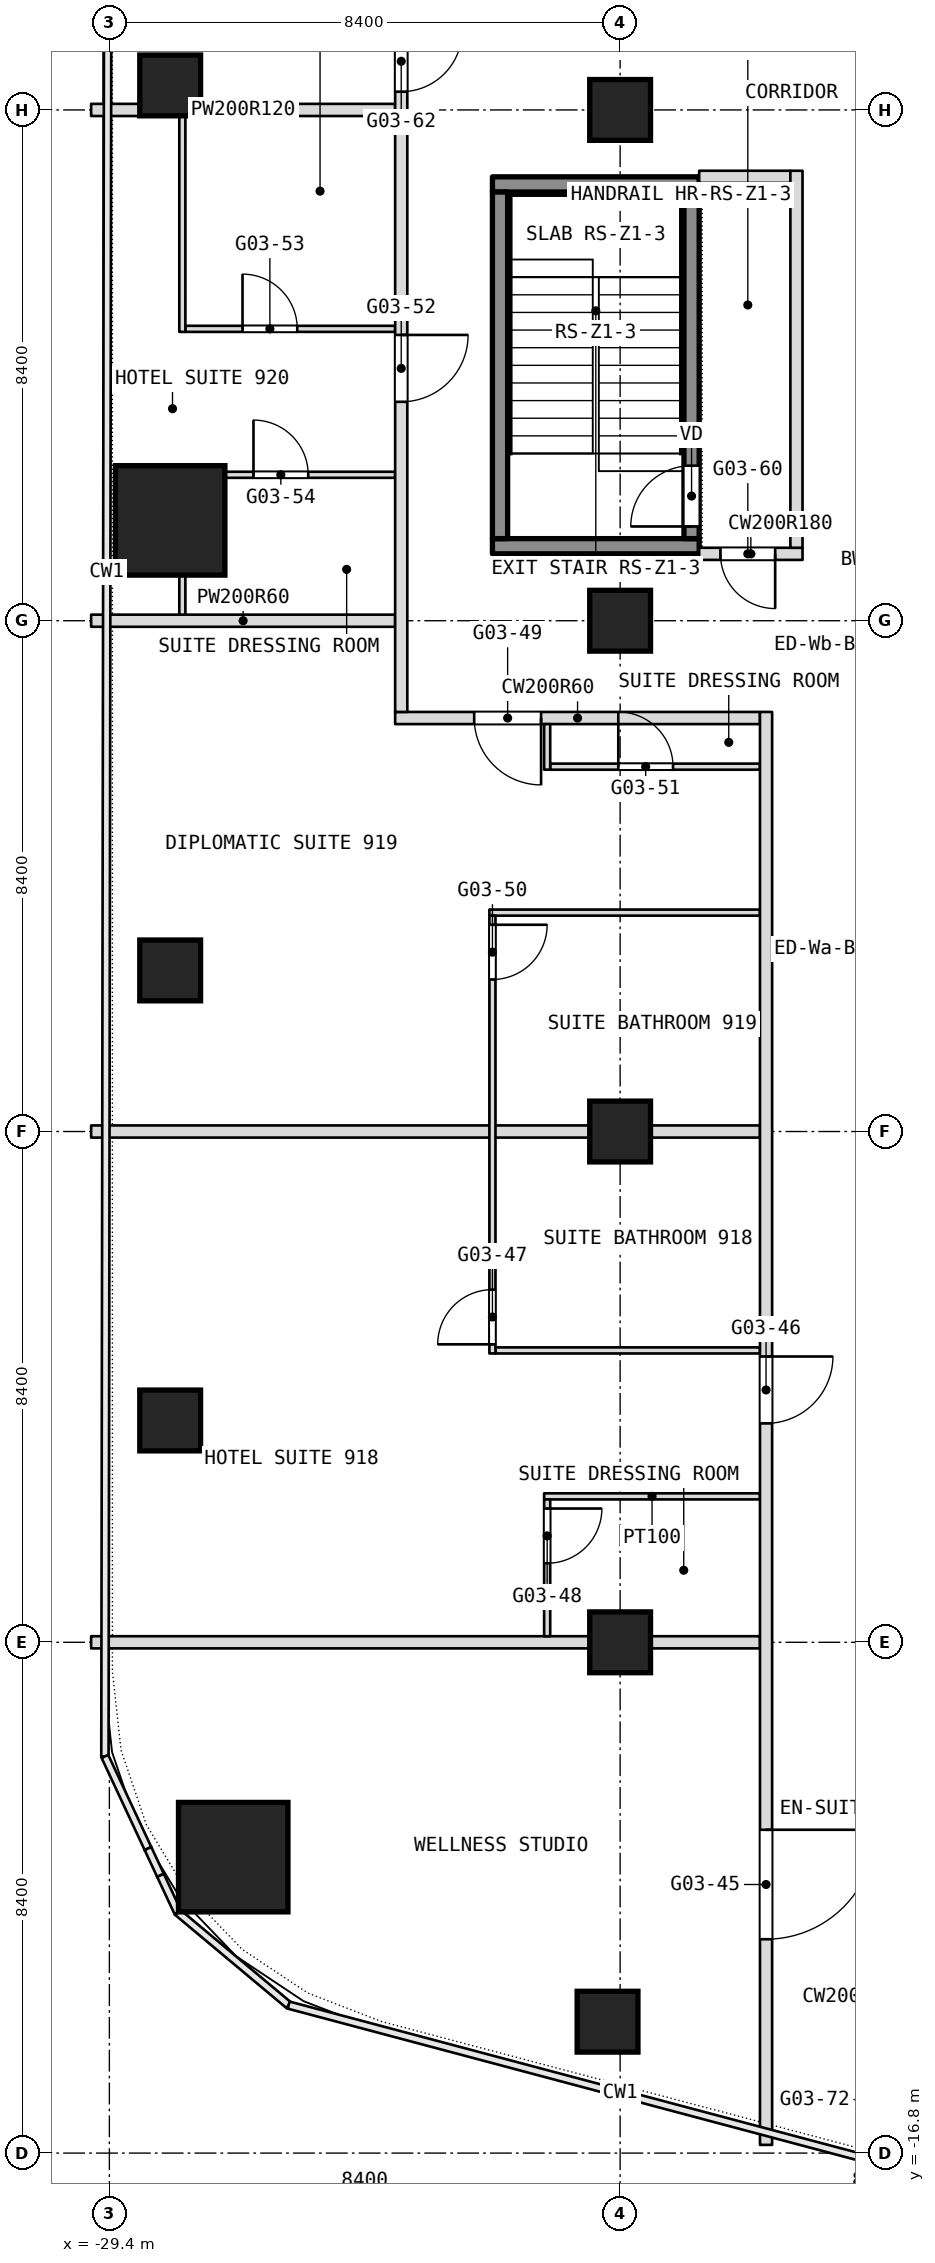
"""IFC4 building model, lengths in metres.
Left out: names, types, materials, properties, quantities, classifications, styles, units other than length and angle.
Written with IfcOpenShell. Run it as: python <this file> out.ifc"""

import sys

from ifc_helpers import new_model, si_unit, direction, frame, frame_2d, origin, origin_2d, place, context, subcontext, project, spatial, rectangle, extrude, element, fill, save


model = new_model("IFC4")
c1 = context("Model", 3, precision=1e-05, world=origin(), true_north=direction((0.0, 1.0)))
c2 = subcontext(c1, "Body", "Model", "MODEL_VIEW")
j1 = project(units=[si_unit("LENGTHUNIT", "METRE"), si_unit("PLANEANGLEUNIT", "RADIAN")], contexts=[c1])
p1 = place(None, origin())
s1 = spatial("IfcSite", under=j1, at=p1, CompositionType="ELEMENT")
p2 = place(p1, origin())
s2 = spatial("IfcBuilding", under=s1, at=p2, CompositionType="ELEMENT")
p3 = place(p2, frame((0.0, 0.0, 47.3)))
s3 = spatial("IfcBuildingStorey", under=s2, at=p3, CompositionType="ELEMENT", Elevation=47.3)
for number, where, z_axis, x_axis in (
    (1, (-27.363, -11.933, 0.0), (0.0, 0.0, 1.0), (1.0, 0.0, 0.0)),
    (2, (-28.4, 10.05, 0.0), (0.0, 0.0, 1.0), (1.0, 0.0, 0.0)),
):
    element("IfcColumn", number, at=place(p3, frame(where, z_axis=z_axis, x_axis=x_axis)), inside=s3, PredefinedType="COLUMN", context=c2, shape_type="SweptSolid", body=[
        extrude(rectangle(XDim=1.8, YDim=1.8, at=origin_2d()), origin(), (0.0, 0.0, 1.0), 3.6),
    ])
for number, where, z_axis, x_axis in (
    (3, (-21.0, -8.4, 0.0), (0.0, 0.0, 1.0), (1.0, 0.0, 0.0)),
    (4, (-21.0, 0.0, 0.0), (0.0, 0.0, 1.0), (1.0, 0.0, 0.0)),
    (5, (-21.0, 8.4, 0.0), (0.0, 0.0, 1.0), (1.0, 0.0, 0.0)),
    (6, (-21.0, 16.8, 0.0), (0.0, 0.0, 1.0), (1.0, 0.0, 0.0)),
    (7, (-28.4, -4.752, 0.0), (0.0, 0.0, 1.0), (1.0, 0.0, 0.0)),
    (8, (-28.4, 2.649, 0.0), (0.0, 0.0, 1.0), (1.0, 0.0, 0.0)),
    (9, (-28.4, 17.203, 0.0), (0.0, 0.0, 1.0), (1.0, 0.0, 0.0)),
    (10, (-21.207, -14.639, 0.0), (0.0, 0.0, 1.0), (1.0, 0.0, 0.0)),
):
    element("IfcColumn", number, at=place(p3, frame(where, z_axis=z_axis, x_axis=x_axis)), inside=s3, PredefinedType="COLUMN", context=c2, shape_type="SweptSolid", body=[
        extrude(rectangle(XDim=1.0, YDim=1.0, at=origin_2d()), origin(), (0.0, 0.0, 1.0), 3.6),
    ])
p4 = place(p3, frame((-29.7, -8.4, 0.0), z_axis=(0.0, 0.0, 1.0), x_axis=(1.0, 0.0, 0.0)))
e11 = element("IfcWall", 11, at=p4, inside=s3, PredefinedType="PARTITIONING", context=c2, shape_type="SweptSolid", body=[
    extrude(rectangle(XDim=11.0, YDim=0.2, at=frame_2d((5.5, 0.0))), origin(), (0.0, 0.0, 1.0), 2.84),
])
p5 = place(p3, frame((-22.25, -6.0, 0.0), z_axis=(0.0, 0.0, 1.0), x_axis=(1.0, 0.0, 0.0)))
e12 = element("IfcWall", 12, at=p5, inside=s3, PredefinedType="PARTITIONING", context=c2, shape_type="SweptSolid", body=[
    extrude(rectangle(XDim=3.55, YDim=0.1, at=frame_2d((1.775, 0.0))), origin(), (0.0, 0.0, 1.0), 3.34),
])
p6 = place(p3, frame((-23.05, -3.6, 0.0), z_axis=(0.0, 0.0, 1.0), x_axis=(1.0, 0.0, 0.0)))
e13 = element("IfcWall", 13, at=p6, inside=s3, PredefinedType="PARTITIONING", context=c2, shape_type="SweptSolid", body=[
    extrude(rectangle(XDim=4.35, YDim=0.1, at=frame_2d((2.175, 0.0))), origin(), (0.0, 0.0, 1.0), 3.34),
])
p7 = place(p3, frame((-29.7, 0.0, 0.0), z_axis=(0.0, 0.0, 1.0), x_axis=(1.0, 0.0, 0.0)))
e14 = element("IfcWall", 14, at=p7, inside=s3, PredefinedType="PARTITIONING", context=c2, shape_type="SweptSolid", body=[
    extrude(rectangle(XDim=11.0, YDim=0.2, at=frame_2d((5.5, 0.0))), origin(), (0.0, 0.0, 1.0), 2.84),
])
p8 = place(p3, frame((-23.15, 3.6, 0.0), z_axis=(0.0, 0.0, 1.0), x_axis=(1.0, 0.0, 0.0)))
e15 = element("IfcWall", 15, at=p8, inside=s3, PredefinedType="PARTITIONING", context=c2, shape_type="SweptSolid", body=[
    extrude(rectangle(XDim=4.45, YDim=0.1, at=frame_2d((2.225, 0.0))), origin(), (0.0, 0.0, 1.0), 3.34),
])
p9 = place(p3, frame((-22.15, 6.0, 0.0), z_axis=(0.0, 0.0, 1.0), x_axis=(1.0, 0.0, 0.0)))
e16 = element("IfcWall", 16, at=p9, inside=s3, PredefinedType="PARTITIONING", context=c2, shape_type="SweptSolid", body=[
    extrude(rectangle(XDim=3.45, YDim=0.1, at=frame_2d((1.725, 0.0))), origin(), (0.0, 0.0, 1.0), 3.34),
])
p10 = place(p9, frame((1.12, 0.0, 0.0)))
e17 = element("IfcOpeningElement", 17, at=p10, cuts=e16, PredefinedType="OPENING", context=c2, shape_type="SweptSolid", body=[
    extrude(rectangle(XDim=0.9, YDim=2.1, at=frame_2d((0.45, 1.05))), frame((0.0, 0.05, 0.0), z_axis=(0.0, -1.0, 0.0), x_axis=(1.0, 0.0, 0.0)), (0.0, 0.0, 1.0), 0.1),
])
p11 = place(p3, frame((-24.7, 6.8, 0.0), z_axis=(0.0, 0.0, 1.0), x_axis=(1.0, 0.0, 0.0)))
e18 = element("IfcWall", 18, at=p11, inside=s3, PredefinedType="PARTITIONING", context=c2, shape_type="SweptSolid", body=[
    extrude(rectangle(XDim=6.0, YDim=0.2, at=frame_2d((3.0, 0.0))), origin(), (0.0, 0.0, 1.0), 3.34),
])
p12 = place(p11, frame((1.3, 0.0, 0.0)))
e19 = element("IfcOpeningElement", 19, at=p12, cuts=e18, PredefinedType="OPENING", context=c2, shape_type="SweptSolid", body=[
    extrude(rectangle(XDim=1.1, YDim=2.1, at=frame_2d((0.55, 1.05))), frame((0.0, 0.1, 0.0), z_axis=(0.0, -1.0, 0.0), x_axis=(1.0, 0.0, 0.0)), (0.0, 0.0, 1.0), 0.2),
])
p13 = place(p3, frame((-29.7, 8.4, 0.0), z_axis=(0.0, 0.0, 1.0), x_axis=(1.0, 0.0, 0.0)))
e20 = element("IfcWall", 20, at=p13, inside=s3, PredefinedType="PARTITIONING", context=c2, shape_type="SweptSolid", body=[
    extrude(rectangle(XDim=5.0, YDim=0.2, at=frame_2d((2.5, 0.0))), origin(), (0.0, 0.0, 1.0), 2.84),
])
p14 = place(p3, frame((-19.7, 9.5, 0.0), z_axis=(0.0, 0.0, 1.0), x_axis=(1.0, 0.0, 0.0)))
e21 = element("IfcWall", 21, at=p14, inside=s3, PredefinedType="PARTITIONING", context=c2, shape_type="SweptSolid", body=[
    extrude(rectangle(XDim=1.7, YDim=0.2, at=frame_2d((0.85, 0.0))), origin(), (0.0, 0.0, 1.0), 3.34),
])
p15 = place(p14, frame((0.35, 0.0, 0.0)))
e22 = element("IfcOpeningElement", 22, at=p15, cuts=e21, PredefinedType="OPENING", context=c2, shape_type="SweptSolid", body=[
    extrude(rectangle(XDim=0.9, YDim=2.1, at=frame_2d((0.45, 1.05))), frame((0.0, 0.1, 0.0), z_axis=(0.0, -1.0, 0.0), x_axis=(1.0, 0.0, 0.0)), (0.0, 0.0, 1.0), 0.2),
])
p16 = place(p3, frame((-27.5, 10.8, 0.0), z_axis=(0.0, 0.0, 1.0), x_axis=(1.0, 0.0, 0.0)))
e23 = element("IfcWall", 23, at=p16, inside=s3, PredefinedType="PARTITIONING", context=c2, shape_type="SweptSolid", body=[
    extrude(rectangle(XDim=2.8, YDim=0.1, at=frame_2d((1.4, 0.0))), origin(), (0.0, 0.0, 1.0), 3.34),
])
p17 = place(p16, frame((0.47, 0.0, 0.0)))
e24 = element("IfcOpeningElement", 24, at=p17, cuts=e23, PredefinedType="OPENING", context=c2, shape_type="SweptSolid", body=[
    extrude(rectangle(XDim=0.9, YDim=2.1, at=frame_2d((0.45, 1.05))), frame((0.0, 0.05, 0.0), z_axis=(0.0, -1.0, 0.0), x_axis=(1.0, 0.0, 0.0)), (0.0, 0.0, 1.0), 0.1),
])
p18 = place(p3, frame((-28.15, 13.2, 0.0), z_axis=(0.0, 0.0, 1.0), x_axis=(1.0, 0.0, 0.0)))
e25 = element("IfcWall", 25, at=p18, inside=s3, PredefinedType="PARTITIONING", context=c2, shape_type="SweptSolid", body=[
    extrude(rectangle(XDim=3.45, YDim=0.1, at=frame_2d((1.725, 0.0))), origin(), (0.0, 0.0, 1.0), 3.34),
])
p19 = place(p18, frame((0.94, 0.0, 0.0)))
e26 = element("IfcOpeningElement", 26, at=p19, cuts=e25, PredefinedType="OPENING", context=c2, shape_type="SweptSolid", body=[
    extrude(rectangle(XDim=0.9, YDim=2.1, at=frame_2d((0.45, 1.05))), frame((0.0, 0.05, 0.0), z_axis=(0.0, -1.0, 0.0), x_axis=(1.0, 0.0, 0.0)), (0.0, 0.0, 1.0), 0.1),
])
p20 = place(p3, frame((-19.7, 15.7, 0.0), z_axis=(0.0, 0.0, 1.0), x_axis=(1.0, 0.0, 0.0)))
e27 = element("IfcWall", 27, at=p20, inside=s3, PredefinedType="PARTITIONING", context=c2, shape_type="SweptSolid", body=[
    extrude(rectangle(XDim=1.5, YDim=0.2, at=frame_2d((0.75, 0.0))), origin(), (0.0, 0.0, 1.0), 3.34),
])
p21 = place(p3, frame((-29.7, 16.8, 0.0), z_axis=(0.0, 0.0, 1.0), x_axis=(1.0, 0.0, 0.0)))
e28 = element("IfcWall", 28, at=p21, inside=s3, PredefinedType="PARTITIONING", context=c2, shape_type="SweptSolid", body=[
    extrude(rectangle(XDim=5.0, YDim=0.2, at=frame_2d((2.5, 0.0))), origin(), (0.0, 0.0, 1.0), 2.84),
])
p22 = place(p3, frame((-18.1, 9.6, 0.0), z_axis=(0.0, 0.0, 1.0), x_axis=(0.0, 1.0, 0.0)))
e29 = element("IfcWall", 29, at=p22, inside=s3, PredefinedType="PARTITIONING", context=c2, shape_type="SweptSolid", body=[
    extrude(rectangle(XDim=6.2, YDim=0.2, at=frame_2d((3.1, 0.0))), origin(), (0.0, 0.0, 1.0), 3.34),
])
p23 = place(p3, frame((-18.6, -16.665, 0.0), z_axis=(0.0, 0.0, 1.0), x_axis=(0.0, 1.0, 0.0)))
e30 = element("IfcWall", 30, at=p23, inside=s3, PredefinedType="PARTITIONING", context=c2, shape_type="SweptSolid", body=[
    extrude(rectangle(XDim=23.565, YDim=0.2, at=frame_2d((11.782, 0.0))), origin(), (0.0, 0.0, 1.0), 3.34),
])
p24 = place(p23, frame((3.382, 0.0, 0.0)))
e31 = element("IfcOpeningElement", 31, at=p24, cuts=e30, PredefinedType="OPENING", context=c2, shape_type="SweptSolid", body=[
    extrude(rectangle(XDim=1.8, YDim=2.1, at=frame_2d((0.9, 1.05))), frame((0.0, 0.1, 0.0), z_axis=(0.0, -1.0, 0.0), x_axis=(1.0, 0.0, 0.0)), (0.0, 0.0, 1.0), 0.2),
])
p25 = place(p23, frame((11.865, 0.0, 0.0)))
e32 = element("IfcOpeningElement", 32, at=p25, cuts=e30, PredefinedType="OPENING", context=c2, shape_type="SweptSolid", body=[
    extrude(rectangle(XDim=1.1, YDim=2.1, at=frame_2d((0.55, 1.05))), frame((0.0, 0.1, 0.0), z_axis=(0.0, -1.0, 0.0), x_axis=(1.0, 0.0, 0.0)), (0.0, 0.0, 1.0), 0.2),
])
p26 = place(p3, frame((-22.2, -8.3, 0.0), z_axis=(0.0, 0.0, 1.0), x_axis=(0.0, 1.0, 0.0)))
e33 = element("IfcWall", 33, at=p26, inside=s3, PredefinedType="PARTITIONING", context=c2, shape_type="SweptSolid", body=[
    extrude(rectangle(XDim=2.25, YDim=0.1, at=frame_2d((1.125, 0.0))), origin(), (0.0, 0.0, 1.0), 3.34),
])
p27 = place(p26, frame((1.2, 0.0, 0.0)))
e34 = element("IfcOpeningElement", 34, at=p27, cuts=e33, PredefinedType="OPENING", context=c2, shape_type="SweptSolid", body=[
    extrude(rectangle(XDim=0.9, YDim=2.1, at=frame_2d((0.45, 1.05))), frame((0.0, 0.05, 0.0), z_axis=(0.0, -1.0, 0.0), x_axis=(1.0, 0.0, 0.0)), (0.0, 0.0, 1.0), 0.1),
])
p28 = place(p3, frame((-22.2, 5.95, 0.0), z_axis=(0.0, 0.0, 1.0), x_axis=(0.0, 1.0, 0.0)))
e35 = element("IfcWall", 35, at=p28, inside=s3, PredefinedType="PARTITIONING", context=c2, shape_type="SweptSolid", body=[
    extrude(rectangle(XDim=0.75, YDim=0.1, at=frame_2d((0.375, 0.0))), origin(), (0.0, 0.0, 1.0), 3.34),
])
p29 = place(p3, frame((-23.1, -3.65, 0.0), z_axis=(0.0, 0.0, 1.0), x_axis=(0.0, 1.0, 0.0)))
e36 = element("IfcWall", 36, at=p29, inside=s3, PredefinedType="PARTITIONING", context=c2, shape_type="SweptSolid", body=[
    extrude(rectangle(XDim=7.2, YDim=0.1, at=frame_2d((3.6, 0.0))), origin(), (0.0, 0.0, 1.0), 3.34),
])
p30 = place(p29, frame((0.15, 0.0, 0.0)))
e37 = element("IfcOpeningElement", 37, at=p30, cuts=e36, PredefinedType="OPENING", context=c2, shape_type="SweptSolid", body=[
    extrude(rectangle(XDim=0.9, YDim=2.1, at=frame_2d((0.45, 1.05))), frame((0.0, 0.05, 0.0), z_axis=(0.0, -1.0, 0.0), x_axis=(1.0, 0.0, 0.0)), (0.0, 0.0, 1.0), 0.1),
])
p31 = place(p29, frame((6.15, 0.0, 0.0)))
e38 = element("IfcOpeningElement", 38, at=p31, cuts=e36, PredefinedType="OPENING", context=c2, shape_type="SweptSolid", body=[
    extrude(rectangle(XDim=0.9, YDim=2.1, at=frame_2d((0.45, 1.05))), frame((0.0, 0.05, 0.0), z_axis=(0.0, -1.0, 0.0), x_axis=(1.0, 0.0, 0.0)), (0.0, 0.0, 1.0), 0.1),
])
p32 = place(p3, frame((-24.6, 6.9, 0.0), z_axis=(0.0, 0.0, 1.0), x_axis=(0.0, 1.0, 0.0)))
e39 = element("IfcWall", 39, at=p32, inside=s3, PredefinedType="PARTITIONING", context=c2, shape_type="SweptSolid", body=[
    extrude(rectangle(XDim=11.6, YDim=0.2, at=frame_2d((5.8, 0.0))), origin(), (0.0, 0.0, 1.0), 3.34),
])
p33 = place(p32, frame((5.1, 0.0, 0.0)))
e40 = element("IfcOpeningElement", 40, at=p33, cuts=e39, PredefinedType="OPENING", context=c2, shape_type="SweptSolid", body=[
    extrude(rectangle(XDim=1.1, YDim=2.1, at=frame_2d((0.55, 1.05))), frame((0.0, 0.1, 0.0), z_axis=(0.0, -1.0, 0.0), x_axis=(1.0, 0.0, 0.0)), (0.0, 0.0, 1.0), 0.2),
])
p34 = place(p32, frame((10.2, 0.0, 0.0)))
e41 = element("IfcOpeningElement", 41, at=p34, cuts=e39, PredefinedType="OPENING", context=c2, shape_type="SweptSolid", body=[
    extrude(rectangle(XDim=1.0, YDim=2.1, at=frame_2d((0.5, 1.05))), frame((0.0, 0.1, 0.0), z_axis=(0.0, -1.0, 0.0), x_axis=(1.0, 0.0, 0.0)), (0.0, 0.0, 1.0), 0.2),
])
p35 = place(p3, frame((-28.2, 8.5, 0.0), z_axis=(0.0, 0.0, 1.0), x_axis=(0.0, 1.0, 0.0)))
e42 = element("IfcWall", 42, at=p35, inside=s3, PredefinedType="PARTITIONING", context=c2, shape_type="SweptSolid", body=[
    extrude(rectangle(XDim=0.65, YDim=0.1, at=frame_2d((0.325, 0.0))), origin(), (0.0, 0.0, 1.0), 2.94),
])
p36 = place(p3, frame((-28.2, 13.15, 0.0), z_axis=(0.0, 0.0, 1.0), x_axis=(0.0, 1.0, 0.0)))
e43 = element("IfcWall", 43, at=p36, inside=s3, PredefinedType="PARTITIONING", context=c2, shape_type="SweptSolid", body=[
    extrude(rectangle(XDim=3.75, YDim=0.1, at=frame_2d((1.875, 0.0))), origin(), (0.0, 0.0, 1.0), 2.94),
])
for number, where, z_axis, x_axis in (
    (44, (-23.1, 9.625, 0.1), (0.0, 0.0, 1.0), (1.0, 0.0, 0.0)),
    (45, (-23.1, 15.575, 0.1), (0.0, 0.0, 1.0), (1.0, 0.0, 0.0)),
):
    element("IfcWall", number, at=place(p3, frame(where, z_axis=z_axis, x_axis=x_axis)), inside=s3, PredefinedType="SHEAR", context=c2, shape_type="SweptSolid", body=[
        extrude(rectangle(XDim=3.4, YDim=0.25, at=frame_2d((1.7, 0.0))), origin(), (0.0, 0.0, 1.0), 3.6),
    ])
p37 = place(p3, frame((-22.975, 9.75, 0.1), z_axis=(0.0, 0.0, 1.0), x_axis=(0.0, 1.0, 0.0)))
e46 = element("IfcWall", 46, at=p37, inside=s3, PredefinedType="SHEAR", context=c2, shape_type="SweptSolid", body=[
    extrude(rectangle(XDim=5.7, YDim=0.25, at=frame_2d((2.85, 0.0))), origin(), (0.0, 0.0, 1.0), 3.6),
])
p38 = place(p3, frame((-19.825, 9.75, 0.1), z_axis=(0.0, 0.0, 1.0), x_axis=(0.0, 1.0, 0.0)))
e47 = element("IfcWall", 47, at=p38, inside=s3, PredefinedType="SHEAR", context=c2, shape_type="SweptSolid", body=[
    extrude(rectangle(XDim=5.7, YDim=0.25, at=frame_2d((2.85, 0.0))), origin(), (0.0, 0.0, 1.0), 3.6),
])
p39 = place(p38, frame((0.2, 0.0, 0.0)))
e48 = element("IfcOpeningElement", 48, at=p39, cuts=e47, PredefinedType="OPENING", context=c2, shape_type="SweptSolid", body=[
    extrude(rectangle(XDim=1.0, YDim=2.1, at=frame_2d((0.5, 1.05))), frame((0.0, 0.125, 0.0), z_axis=(0.0, -1.0, 0.0), x_axis=(1.0, 0.0, 0.0)), (0.0, 0.0, 1.0), 0.25),
])
p40 = place(p10, origin())
e49 = element("IfcDoor", 49, at=p40, inside=s3, OperationType="SINGLE_SWING_RIGHT", PredefinedType="DOOR", context=c2, shape_type="SweptSolid", body=[
    extrude(rectangle(XDim=0.9, YDim=2.1, at=frame_2d((0.45, 1.05))), frame((0.0, 0.025, 0.0), z_axis=(0.0, -1.0, 0.0), x_axis=(1.0, 0.0, 0.0)), (0.0, 0.0, 1.0), 0.05),
])
fill(e17, e49)
p41 = place(p12, origin())
e50 = element("IfcDoor", 50, at=p41, inside=s3, OperationType="SINGLE_SWING_LEFT", PredefinedType="DOOR", context=c2, shape_type="SweptSolid", body=[
    extrude(rectangle(XDim=1.1, YDim=2.1, at=frame_2d((0.55, 1.05))), frame((0.0, 0.025, 0.0), z_axis=(0.0, -1.0, 0.0), x_axis=(1.0, 0.0, 0.0)), (0.0, 0.0, 1.0), 0.05),
])
fill(e19, e50)
p42 = place(p15, origin())
e51 = element("IfcDoor", 51, at=p42, inside=s3, OperationType="SINGLE_SWING_RIGHT", PredefinedType="DOOR", context=c2, shape_type="SweptSolid", body=[
    extrude(rectangle(XDim=0.9, YDim=2.1, at=frame_2d((0.45, 1.05))), frame((0.0, 0.025, 0.0), z_axis=(0.0, -1.0, 0.0), x_axis=(1.0, 0.0, 0.0)), (0.0, 0.0, 1.0), 0.05),
])
fill(e22, e51)
p43 = place(p17, origin())
e52 = element("IfcDoor", 52, at=p43, inside=s3, OperationType="SINGLE_SWING_RIGHT", PredefinedType="DOOR", context=c2, shape_type="SweptSolid", body=[
    extrude(rectangle(XDim=0.9, YDim=2.1, at=frame_2d((0.45, 1.05))), frame((0.0, 0.025, 0.0), z_axis=(0.0, -1.0, 0.0), x_axis=(1.0, 0.0, 0.0)), (0.0, 0.0, 1.0), 0.05),
])
fill(e24, e52)
p44 = place(p19, origin())
e53 = element("IfcDoor", 53, at=p44, inside=s3, OperationType="SINGLE_SWING_LEFT", PredefinedType="DOOR", context=c2, shape_type="SweptSolid", body=[
    extrude(rectangle(XDim=0.9, YDim=2.1, at=frame_2d((0.45, 1.05))), frame((0.0, 0.025, 0.0), z_axis=(0.0, -1.0, 0.0), x_axis=(1.0, 0.0, 0.0)), (0.0, 0.0, 1.0), 0.05),
])
fill(e26, e53)
p45 = place(p24, origin())
e54 = element("IfcDoor", 54, at=p45, inside=s3, OperationType="DOUBLE_DOOR_SINGLE_SWING", PredefinedType="DOOR", context=c2, shape_type="SweptSolid", body=[
    extrude(rectangle(XDim=1.8, YDim=2.1, at=frame_2d((0.9, 1.05))), frame((0.0, 0.025, 0.0), z_axis=(0.0, -1.0, 0.0), x_axis=(1.0, 0.0, 0.0)), (0.0, 0.0, 1.0), 0.05),
])
fill(e31, e54)
p46 = place(p25, origin())
e55 = element("IfcDoor", 55, at=p46, inside=s3, OperationType="SINGLE_SWING_RIGHT", PredefinedType="DOOR", context=c2, shape_type="SweptSolid", body=[
    extrude(rectangle(XDim=1.1, YDim=2.1, at=frame_2d((0.55, 1.05))), frame((0.0, 0.025, 0.0), z_axis=(0.0, -1.0, 0.0), x_axis=(1.0, 0.0, 0.0)), (0.0, 0.0, 1.0), 0.05),
])
fill(e32, e55)
p47 = place(p27, origin())
e56 = element("IfcDoor", 56, at=p47, inside=s3, OperationType="SINGLE_SWING_LEFT", PredefinedType="DOOR", context=c2, shape_type="SweptSolid", body=[
    extrude(rectangle(XDim=0.9, YDim=2.1, at=frame_2d((0.45, 1.05))), frame((0.0, 0.025, 0.0), z_axis=(0.0, -1.0, 0.0), x_axis=(1.0, 0.0, 0.0)), (0.0, 0.0, 1.0), 0.05),
])
fill(e34, e56)
p48 = place(p30, origin())
e57 = element("IfcDoor", 57, at=p48, inside=s3, OperationType="SINGLE_SWING_RIGHT", PredefinedType="DOOR", context=c2, shape_type="SweptSolid", body=[
    extrude(rectangle(XDim=0.9, YDim=2.1, at=frame_2d((0.45, 1.05))), frame((0.0, 0.025, 0.0), z_axis=(0.0, -1.0, 0.0), x_axis=(1.0, 0.0, 0.0)), (0.0, 0.0, 1.0), 0.05),
])
fill(e37, e57)
p49 = place(p31, origin())
e58 = element("IfcDoor", 58, at=p49, inside=s3, OperationType="SINGLE_SWING_LEFT", PredefinedType="DOOR", context=c2, shape_type="SweptSolid", body=[
    extrude(rectangle(XDim=0.9, YDim=2.1, at=frame_2d((0.45, 1.05))), frame((0.0, 0.025, 0.0), z_axis=(0.0, -1.0, 0.0), x_axis=(1.0, 0.0, 0.0)), (0.0, 0.0, 1.0), 0.05),
])
fill(e38, e58)
p50 = place(p33, origin())
e59 = element("IfcDoor", 59, at=p50, inside=s3, OperationType="SINGLE_SWING_RIGHT", PredefinedType="DOOR", context=c2, shape_type="SweptSolid", body=[
    extrude(rectangle(XDim=1.1, YDim=2.1, at=frame_2d((0.55, 1.05))), frame((0.0, 0.025, 0.0), z_axis=(0.0, -1.0, 0.0), x_axis=(1.0, 0.0, 0.0)), (0.0, 0.0, 1.0), 0.05),
])
fill(e40, e59)
p51 = place(p34, origin())
e60 = element("IfcDoor", 60, at=p51, inside=s3, OperationType="SINGLE_SWING_RIGHT", PredefinedType="DOOR", context=c2, shape_type="SweptSolid", body=[
    extrude(rectangle(XDim=1.0, YDim=2.1, at=frame_2d((0.5, 1.05))), frame((0.0, 0.025, 0.0), z_axis=(0.0, -1.0, 0.0), x_axis=(1.0, 0.0, 0.0)), (0.0, 0.0, 1.0), 0.05),
])
fill(e41, e60)
p52 = place(p39, origin())
e61 = element("IfcDoor", 61, at=p52, inside=s3, OperationType="SINGLE_SWING_LEFT", PredefinedType="DOOR", context=c2, shape_type="SweptSolid", body=[
    extrude(rectangle(XDim=1.0, YDim=2.1, at=frame_2d((0.5, 1.05))), frame((0.0, 0.025, 0.0), z_axis=(0.0, -1.0, 0.0), x_axis=(1.0, 0.0, 0.0)), (0.0, 0.0, 1.0), 0.05),
])
fill(e48, e61)
save(model, sys.argv[1])
